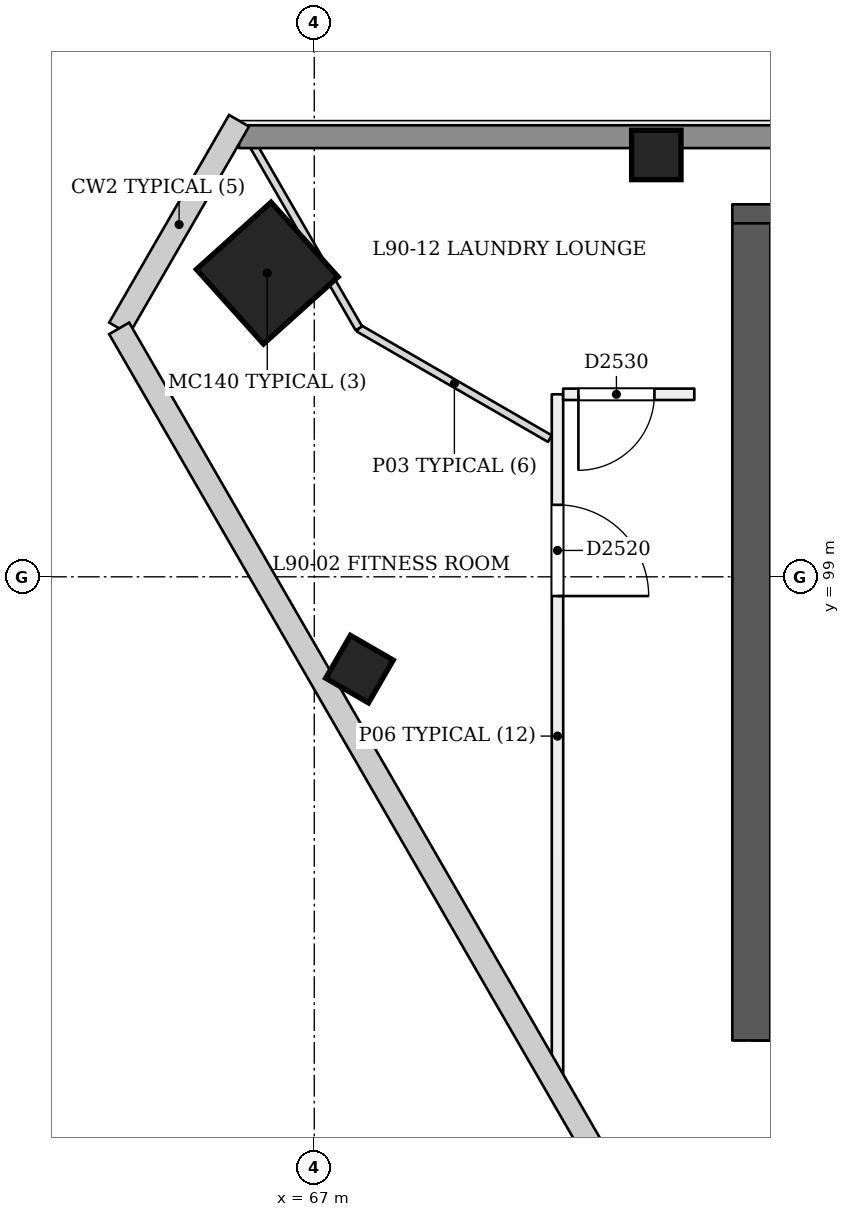
"""IFC4 building model, lengths in metres.
Left out: names, types, materials, properties, quantities, classifications, styles, units other than length and angle.
Written with IfcOpenShell. Run it as: python <this file> out.ifc"""

import sys

from ifc_helpers import new_model, si_unit, direction, frame, frame_2d, origin, origin_2d, place, context, subcontext, project, spatial, rectangle, extrude, element, fill, save


model = new_model("IFC4")
c1 = context("Model", 3, precision=1e-05, world=origin(), true_north=direction((0.0, 1.0)))
c2 = subcontext(c1, "Body", "Model", "MODEL_VIEW")
j1 = project(units=[si_unit("LENGTHUNIT", "METRE"), si_unit("PLANEANGLEUNIT", "RADIAN")], contexts=[c1])
p1 = place(None, origin())
s1 = spatial("IfcSite", under=j1, at=p1, CompositionType="ELEMENT")
p2 = place(p1, origin())
s2 = spatial("IfcBuilding", under=s1, at=p2, CompositionType="ELEMENT")
p3 = place(p2, frame((0.0, 0.0, 347.2)))
s3 = spatial("IfcBuildingStorey", under=s2, at=p3, CompositionType="ELEMENT", Elevation=347.2)
p4 = place(p3, frame((72.75, 93.15, 0.0), z_axis=(0.0, 0.0, 1.0), x_axis=(1.0, 0.0, 0.0)))
e1 = element("IfcWall", 1, at=p4, inside=s3, PredefinedType="SHEAR", context=c2, shape_type="SweptSolid", body=[
    extrude(rectangle(XDim=24.75, YDim=0.5, at=frame_2d((12.375, 0.0))), origin(), (0.0, 0.0, 1.0), 3.6),
])
p5 = place(p4, frame((1.05, 0.0, 0.0)))
e2 = element("IfcOpeningElement", 2, at=p5, cuts=e1, PredefinedType="OPENING", context=c2, shape_type="SweptSolid", body=[
    extrude(rectangle(XDim=1.2, YDim=2.1, at=frame_2d((0.6, 1.05))), frame((0.0, 0.26, 0.0), z_axis=(0.0, -1.0, 0.0), x_axis=(1.0, 0.0, 0.0)), (0.0, 0.0, 1.0), 0.521),
])
p6 = place(p4, frame((3.25, 0.0, 0.0)))
e3 = element("IfcOpeningElement", 3, at=p6, cuts=e1, PredefinedType="OPENING", context=c2, shape_type="SweptSolid", body=[
    extrude(rectangle(XDim=1.2, YDim=2.1, at=frame_2d((0.6, 1.05))), frame((0.0, 0.26, 0.0), z_axis=(0.0, -1.0, 0.0), x_axis=(1.0, 0.0, 0.0)), (0.0, 0.0, 1.0), 0.521),
])
p7 = place(p4, frame((13.25, 0.0, 0.0)))
e4 = element("IfcOpeningElement", 4, at=p7, cuts=e1, PredefinedType="OPENING", context=c2, shape_type="SweptSolid", body=[
    extrude(rectangle(XDim=1.2, YDim=2.1, at=frame_2d((0.6, 1.05))), frame((0.0, 0.26, 0.0), z_axis=(0.0, -1.0, 0.0), x_axis=(1.0, 0.0, 0.0)), (0.0, 0.0, 1.0), 0.521),
])
p8 = place(p4, frame((15.712, 0.0, 0.0)))
e5 = element("IfcOpeningElement", 5, at=p8, cuts=e1, PredefinedType="OPENING", context=c2, shape_type="SweptSolid", body=[
    extrude(rectangle(XDim=1.0, YDim=2.1, at=frame_2d((0.5, 1.05))), frame((0.0, 0.26, 0.0), z_axis=(0.0, -1.0, 0.0), x_axis=(1.0, 0.0, 0.0)), (0.0, 0.0, 1.0), 0.521),
])
p9 = place(p4, frame((18.15, 0.0, 0.0)))
e6 = element("IfcOpeningElement", 6, at=p9, cuts=e1, PredefinedType="OPENING", context=c2, shape_type="SweptSolid", body=[
    extrude(rectangle(XDim=1.0, YDim=2.1, at=frame_2d((0.5, 1.05))), frame((0.0, 0.26, 0.0), z_axis=(0.0, -1.0, 0.0), x_axis=(1.0, 0.0, 0.0)), (0.0, 0.0, 1.0), 0.521),
])
p10 = place(p4, frame((20.5, 0.0, 0.0)))
e7 = element("IfcOpeningElement", 7, at=p10, cuts=e1, PredefinedType="OPENING", context=c2, shape_type="SweptSolid", body=[
    extrude(rectangle(XDim=1.0, YDim=2.1, at=frame_2d((0.5, 1.05))), frame((0.0, 0.26, 0.0), z_axis=(0.0, -1.0, 0.0), x_axis=(1.0, 0.0, 0.0)), (0.0, 0.0, 1.0), 0.521),
])
p11 = place(p4, frame((22.788, 0.0, 0.0)))
e8 = element("IfcOpeningElement", 8, at=p11, cuts=e1, PredefinedType="OPENING", context=c2, shape_type="SweptSolid", body=[
    extrude(rectangle(XDim=1.0, YDim=2.1, at=frame_2d((0.5, 1.05))), frame((0.0, 0.26, 0.0), z_axis=(0.0, -1.0, 0.0), x_axis=(1.0, 0.0, 0.0)), (0.0, 0.0, 1.0), 0.521),
])
p12 = place(p3, frame((97.25, 103.65, 0.0), z_axis=(0.0, 0.0, 1.0), x_axis=(-1.0, 0.0, 0.0)))
e9 = element("IfcWall", 9, at=p12, inside=s3, PredefinedType="SHEAR", context=c2, shape_type="SweptSolid", body=[
    extrude(rectangle(XDim=24.75, YDim=0.5, at=frame_2d((12.375, 0.0))), origin(), (0.0, 0.0, 1.0), 3.6),
])
p13 = place(p3, frame((72.75, 103.65, 0.0), z_axis=(0.0, 0.0, 1.0), x_axis=(0.0, -1.0, 0.0)))
e10 = element("IfcWall", 10, at=p13, inside=s3, PredefinedType="SHEAR", context=c2, shape_type="SweptSolid", body=[
    extrude(rectangle(XDim=10.75, YDim=0.5, at=frame_2d((5.375, 0.0))), origin(), (0.0, 0.0, 1.0), 3.6),
])
p14 = place(p3, frame((66.347, 102.984, 0.0), z_axis=(0.028401814599, 0.009218727412, 0.999554076572), x_axis=(-0.865125874126, 0.501157480114, 0.019960011119)))
e11 = element("IfcColumn", 11, at=p14, inside=s3, PredefinedType="COLUMN", context=c2, shape_type="SweptSolid", body=[
    extrude(rectangle(XDim=1.32, YDim=1.32, at=origin_2d()), origin(), (0.0, 0.0, 1.0), 3.602),
])
p15 = place(p3, frame((71.5, 104.55, 0.0), z_axis=(0.0, 0.0, 1.0), x_axis=(1.0, 0.0, 0.0)))
e12 = element("IfcColumn", 12, at=p15, inside=s3, PredefinedType="COLUMN", context=c2, shape_type="SweptSolid", body=[
    extrude(rectangle(XDim=0.65, YDim=0.65, at=origin_2d()), origin(), (0.0, 0.0, 1.0), 3.6),
])
p16 = place(p3, frame((67.568, 97.739, 0.0), z_axis=(0.022207898747, 0.03842102728, 0.99901483167), x_axis=(-0.865843370445, -0.498836867213, 0.03843224902)))
e13 = element("IfcColumn", 13, at=p16, inside=s3, PredefinedType="COLUMN", context=c2, shape_type="SweptSolid", body=[
    extrude(rectangle(XDim=0.65, YDim=0.65, at=origin_2d()), origin(), (0.0, 0.0, 1.0), 3.584),
])
p17 = place(p3, frame((70.2, 101.401, 0.0), z_axis=(0.0, 0.0, 1.0), x_axis=(2.714883e-05, -0.999999999631, 0.0)))
e14 = element("IfcWall", 14, at=p17, inside=s3, PredefinedType="PARTITIONING", context=c2, shape_type="SweptSolid", body=[
    extrude(rectangle(XDim=8.993, YDim=0.15, at=frame_2d((4.496, 0.0))), origin(), (0.0, 0.0, 1.0), 2.7),
])
p18 = place(p17, frame((1.454, 0.0, 0.0)))
e15 = element("IfcOpeningElement", 15, at=p18, cuts=e14, PredefinedType="OPENING", context=c2, shape_type="SweptSolid", body=[
    extrude(rectangle(XDim=1.2, YDim=2.1, at=frame_2d((0.6, 1.05))), frame((0.0, 0.085, 0.0), z_axis=(0.0, -1.0, 0.0), x_axis=(1.0, 0.0, 0.0)), (0.0, 0.0, 1.0), 0.171),
])
p19 = place(p3, frame((72.0, 101.401, 0.0), z_axis=(0.0, 0.0, 1.0), x_axis=(-1.0, 0.0, 0.0)))
e16 = element("IfcWall", 16, at=p19, inside=s3, PredefinedType="PARTITIONING", context=c2, shape_type="SweptSolid", body=[
    extrude(rectangle(XDim=1.725, YDim=0.15, at=frame_2d((0.863, 0.0))), origin(), (0.0, 0.0, 1.0), 3.2),
])
p20 = place(p19, frame((0.525, 0.0, 0.0)))
e17 = element("IfcOpeningElement", 17, at=p20, cuts=e16, PredefinedType="OPENING", context=c2, shape_type="SweptSolid", body=[
    extrude(rectangle(XDim=1.0, YDim=2.1, at=frame_2d((0.5, 1.05))), frame((0.0, 0.085, 0.0), z_axis=(0.0, -1.0, 0.0), x_axis=(1.0, 0.0, 0.0)), (0.0, 0.0, 1.0), 0.171),
])
p21 = place(p3, frame((70.1, 100.818, 0.0), z_axis=(0.0, 0.0, 1.0), x_axis=(-0.866007607235, 0.500030823262, 0.0)))
e18 = element("IfcWall", 18, at=p21, inside=s3, PredefinedType="PARTITIONING", context=c2, shape_type="SweptSolid", body=[
    extrude(rectangle(XDim=2.901, YDim=0.1, at=frame_2d((1.451, 0.0))), origin(), (0.0, 0.0, 1.0), 3.2),
])
p22 = place(p3, frame((67.587, 102.269, 0.0), z_axis=(0.0, 0.0, 1.0), x_axis=(-0.500019211527, 0.86601431172, 0.0)))
e19 = element("IfcWall", 19, at=p22, inside=s3, PredefinedType="PARTITIONING", context=c2, shape_type="SweptSolid", body=[
    extrude(rectangle(XDim=3.039, YDim=0.1, at=frame_2d((1.519, 0.0))), origin(), (0.0, 0.0, 1.0), 2.7),
])
p23 = place(p3, frame((66.01, 104.79, 0.0), z_axis=(0.0, 0.0, 1.0), x_axis=(1.0, 0.0, 0.0)))
e20 = element("IfcWall", 20, at=p23, inside=s3, PredefinedType="SOLIDWALL", context=c2, shape_type="SweptSolid", body=[
    extrude(rectangle(XDim=37.979, YDim=0.3, at=frame_2d((18.99, 0.0))), origin(), (0.0, 0.0, 1.0), 2.7),
])
p24 = place(p18, origin())
e21 = element("IfcDoor", 21, at=p24, inside=s3, OperationType="SINGLE_SWING_RIGHT", PredefinedType="NOTDEFINED", context=c2, shape_type="SweptSolid", body=[
    extrude(rectangle(XDim=1.2, YDim=2.1, at=frame_2d((0.6, 1.05))), frame((0.0, 0.025, 0.0), z_axis=(0.0, -1.0, 0.0), x_axis=(1.0, 0.0, 0.0)), (0.0, 0.0, 1.0), 0.05),
])
fill(e15, e21)
p25 = place(p20, origin())
e22 = element("IfcDoor", 22, at=p25, inside=s3, OperationType="SINGLE_SWING_RIGHT", PredefinedType="NOTDEFINED", context=c2, shape_type="SweptSolid", body=[
    extrude(rectangle(XDim=1.0, YDim=2.1, at=frame_2d((0.5, 1.05))), frame((0.0, 0.025, 0.0), z_axis=(0.0, -1.0, 0.0), x_axis=(1.0, 0.0, 0.0)), (0.0, 0.0, 1.0), 0.05),
])
fill(e17, e22)
save(model, sys.argv[1])
